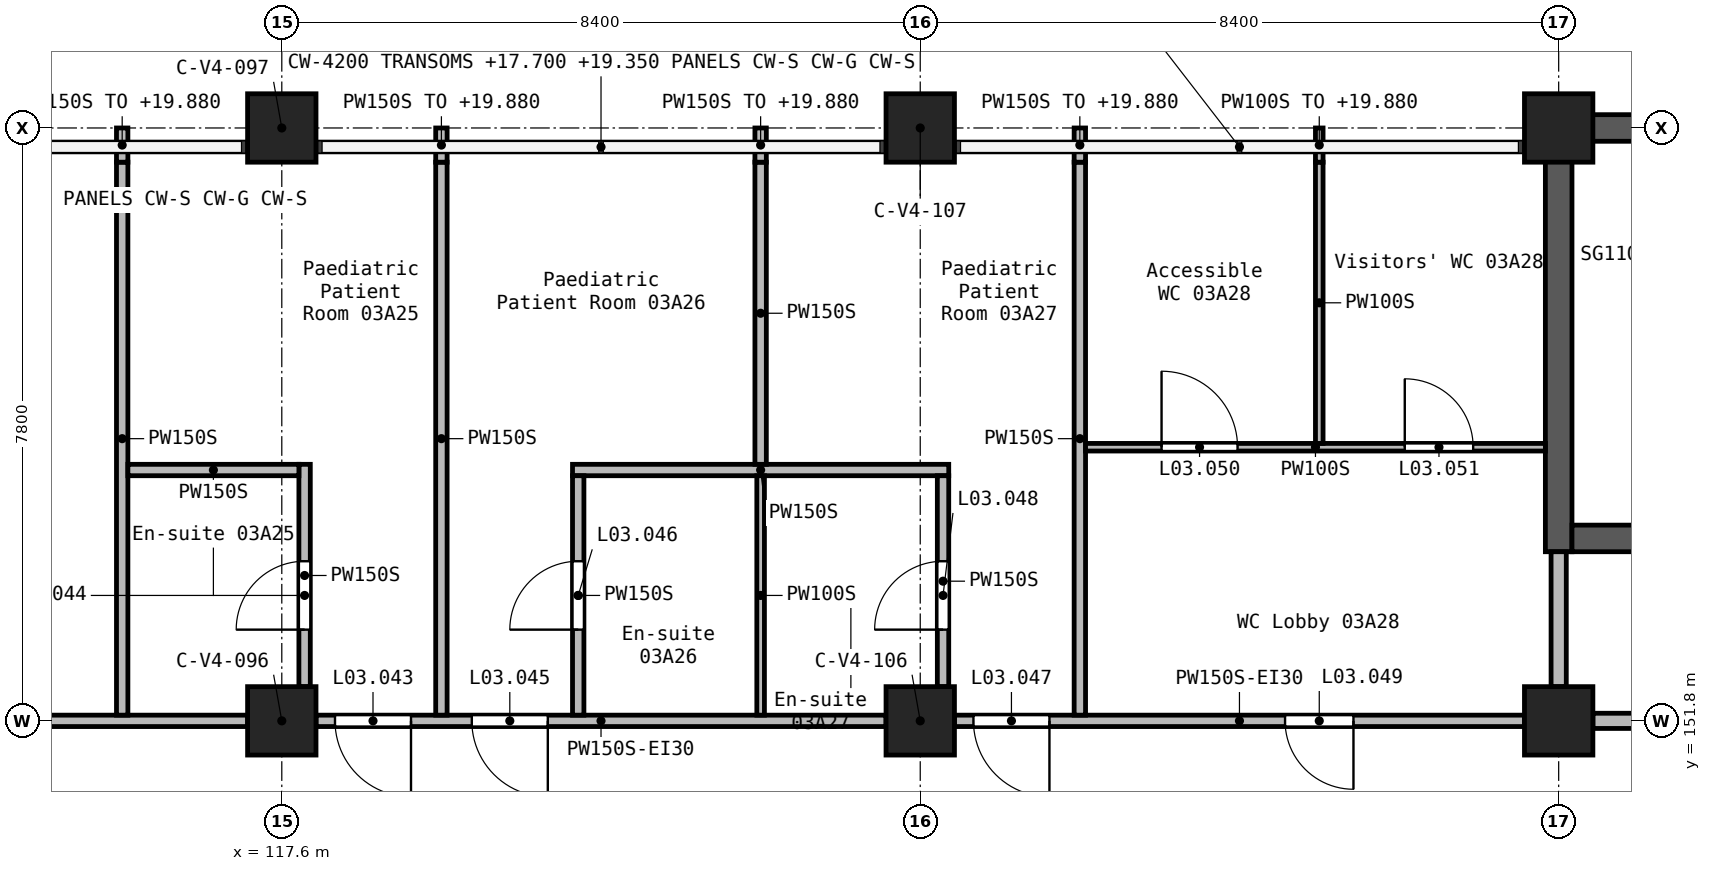
"""IFC4 building model, lengths in metres.
Left out: names, types, materials, properties, quantities, classifications, styles, units other than length and angle.
Written with IfcOpenShell. Run it as: python <this file> out.ifc"""

import sys

from ifc_helpers import new_model, si_unit, direction, frame, frame_2d, origin, origin_2d, place, context, subcontext, project, spatial, rectangle, extrude, element, fill, save


model = new_model("IFC4")
c1 = context("Model", 3, precision=1e-05, world=origin(), true_north=direction((0.0, 1.0)))
c2 = subcontext(c1, "Body", "Model", "MODEL_VIEW")
j1 = project(units=[si_unit("LENGTHUNIT", "METRE"), si_unit("PLANEANGLEUNIT", "RADIAN")], contexts=[c1])
p1 = place(None, origin())
s1 = spatial("IfcSite", under=j1, at=p1, CompositionType="ELEMENT")
p2 = place(p1, origin())
s2 = spatial("IfcBuilding", under=s1, at=p2, CompositionType="ELEMENT")
p3 = place(p2, frame((0.0, 0.0, 16.8)))
s3 = spatial("IfcBuildingStorey", under=s2, at=p3, CompositionType="ELEMENT", Elevation=16.8)
for number, where, z_axis, x_axis in (
    (1, (117.6, 151.8, 0.0), (0.0, 0.0, 1.0), (1.0, 0.0, 0.0)),
    (2, (117.6, 159.6, 0.0), (0.0, 0.0, 1.0), (1.0, 0.0, 0.0)),
    (3, (126.0, 151.8, 0.0), (0.0, 0.0, 1.0), (1.0, 0.0, 0.0)),
    (4, (126.0, 159.6, 0.0), (0.0, 0.0, 1.0), (1.0, 0.0, 0.0)),
    (5, (134.4, 151.8, 0.0), (0.0, 0.0, 1.0), (1.0, 0.0, 0.0)),
    (6, (134.4, 159.6, 0.0), (0.0, 0.0, 1.0), (1.0, 0.0, 0.0)),
):
    element("IfcColumn", number, at=place(p3, frame(where, z_axis=z_axis, x_axis=x_axis)), inside=s3, PredefinedType="COLUMN", context=c2, shape_type="SweptSolid", body=[
        extrude(rectangle(XDim=0.9, YDim=0.9, at=origin_2d()), origin(), (0.0, 0.0, 1.0), 4.2),
    ])
p4 = place(p3, frame((134.225, 159.6, 0.0), z_axis=(0.0, 0.0, 1.0), x_axis=(1.0, 0.0, 0.0)))
e7 = element("IfcWall", 7, at=p4, inside=s3, PredefinedType="SHEAR", context=c2, shape_type="SweptSolid", body=[
    extrude(rectangle(XDim=8.4, YDim=0.35, at=frame_2d((4.2, 0.0))), origin(), (0.0, 0.0, 1.0), 4.2),
])
p5 = place(p3, frame((134.4, 154.025, 0.0), z_axis=(0.0, 0.0, 1.0), x_axis=(0.0, 1.0, 0.0)))
e8 = element("IfcWall", 8, at=p5, inside=s3, PredefinedType="SHEAR", context=c2, shape_type="SweptSolid", body=[
    extrude(rectangle(XDim=5.4, YDim=0.35, at=frame_2d((2.7, 0.0))), origin(), (0.0, 0.0, 1.0), 4.2),
])
p6 = place(p3, frame((134.575, 154.2, 0.0), z_axis=(0.0, 0.0, 1.0), x_axis=(1.0, 0.0, 0.0)))
e9 = element("IfcWall", 9, at=p6, inside=s3, PredefinedType="SHEAR", context=c2, shape_type="SweptSolid", body=[
    extrude(rectangle(XDim=8.05, YDim=0.35, at=frame_2d((4.025, 0.0))), origin(), (0.0, 0.0, 1.0), 4.2),
])
p7 = place(p6, frame((6.525, 0.0, 0.0)))
e10 = element("IfcOpeningElement", 10, at=p7, cuts=e9, PredefinedType="OPENING", context=c2, shape_type="SweptSolid", body=[
    extrude(rectangle(XDim=1.1, YDim=2.1, at=frame_2d((0.55, 1.05))), frame((0.0, 0.185, 0.0), z_axis=(0.0, -1.0, 0.0), x_axis=(1.0, 0.0, 0.0)), (0.0, 0.0, 1.0), 0.37),
])
p8 = place(p3, frame((134.85, 151.8, 0.0), z_axis=(0.0, 0.0, 1.0), x_axis=(1.0, 0.0, 0.0)))
e11 = element("IfcWall", 11, at=p8, inside=s3, PredefinedType="SOLIDWALL", context=c2, shape_type="SweptSolid", body=[
    extrude(rectangle(XDim=7.5, YDim=0.2, at=frame_2d((3.75, 0.0))), origin(), (0.0, 0.0, 1.0), 3.9),
])
p9 = place(p8, frame((3.2, 0.0, 0.0)))
e12 = element("IfcOpeningElement", 12, at=p9, cuts=e11, PredefinedType="OPENING", context=c2, shape_type="SweptSolid", body=[
    extrude(rectangle(XDim=1.1, YDim=2.1, at=frame_2d((0.55, 1.05))), frame((0.0, 0.11, 0.0), z_axis=(0.0, -1.0, 0.0), x_axis=(1.0, 0.0, 0.0)), (0.0, 0.0, 1.0), 0.22),
])
p10 = place(p3, frame((134.4, 152.25, 0.0), z_axis=(0.0, 0.0, 1.0), x_axis=(0.0, 1.0, 0.0)))
e13 = element("IfcWall", 13, at=p10, inside=s3, PredefinedType="SOLIDWALL", context=c2, shape_type="SweptSolid", body=[
    extrude(rectangle(XDim=1.775, YDim=0.2, at=frame_2d((0.887, 0.0))), origin(), (0.0, 0.0, 1.0), 3.9),
])
p11 = place(p3, frame((133.95, 151.8, 0.0), z_axis=(0.0, 0.0, 1.0), x_axis=(-1.0, 0.0, 0.0)))
e14 = element("IfcWall", 14, at=p11, inside=s3, PredefinedType="PARTITIONING", context=c2, shape_type="SweptSolid", body=[
    extrude(rectangle(XDim=7.5, YDim=0.15, at=frame_2d((3.75, 0.0))), origin(), (0.0, 0.0, 1.0), 3.9),
])
p12 = place(p11, frame((6.25, 0.0, 0.0)))
e15 = element("IfcOpeningElement", 15, at=p12, cuts=e14, PredefinedType="OPENING", context=c2, shape_type="SweptSolid", body=[
    extrude(rectangle(XDim=1.0, YDim=2.1, at=frame_2d((0.5, 1.05))), frame((0.0, 0.085, 0.0), z_axis=(0.0, -1.0, 0.0), x_axis=(1.0, 0.0, 0.0)), (0.0, 0.0, 1.0), 0.17),
])
p13 = place(p11, frame((2.25, 0.0, 0.0)))
e16 = element("IfcOpeningElement", 16, at=p13, cuts=e14, PredefinedType="OPENING", context=c2, shape_type="SweptSolid", body=[
    extrude(rectangle(XDim=0.9, YDim=2.1, at=frame_2d((0.45, 1.05))), frame((0.0, 0.085, 0.0), z_axis=(0.0, -1.0, 0.0), x_axis=(1.0, 0.0, 0.0)), (0.0, 0.0, 1.0), 0.17),
])
p14 = place(p3, frame((125.55, 151.8, 0.0), z_axis=(0.0, 0.0, 1.0), x_axis=(-1.0, 0.0, 0.0)))
e17 = element("IfcWall", 17, at=p14, inside=s3, PredefinedType="PARTITIONING", context=c2, shape_type="SweptSolid", body=[
    extrude(rectangle(XDim=7.5, YDim=0.15, at=frame_2d((3.75, 0.0))), origin(), (0.0, 0.0, 1.0), 3.9),
])
p15 = place(p14, frame((6.25, 0.0, 0.0)))
e18 = element("IfcOpeningElement", 18, at=p15, cuts=e17, PredefinedType="OPENING", context=c2, shape_type="SweptSolid", body=[
    extrude(rectangle(XDim=1.0, YDim=2.1, at=frame_2d((0.5, 1.05))), frame((0.0, 0.085, 0.0), z_axis=(0.0, -1.0, 0.0), x_axis=(1.0, 0.0, 0.0)), (0.0, 0.0, 1.0), 0.17),
])
p16 = place(p14, frame((4.45, 0.0, 0.0)))
e19 = element("IfcOpeningElement", 19, at=p16, cuts=e17, PredefinedType="OPENING", context=c2, shape_type="SweptSolid", body=[
    extrude(rectangle(XDim=1.0, YDim=2.1, at=frame_2d((0.5, 1.05))), frame((0.0, 0.085, 0.0), z_axis=(0.0, -1.0, 0.0), x_axis=(1.0, 0.0, 0.0)), (0.0, 0.0, 1.0), 0.17),
])
p17 = place(p3, frame((117.15, 151.8, 0.0), z_axis=(0.0, 0.0, 1.0), x_axis=(-1.0, 0.0, 0.0)))
e20 = element("IfcWall", 20, at=p17, inside=s3, PredefinedType="PARTITIONING", context=c2, shape_type="SweptSolid", body=[
    extrude(rectangle(XDim=7.5, YDim=0.15, at=frame_2d((3.75, 0.0))), origin(), (0.0, 0.0, 1.0), 3.9),
])
p18 = place(p17, frame((2.95, 0.0, 0.0)))
e21 = element("IfcOpeningElement", 21, at=p18, cuts=e20, PredefinedType="OPENING", context=c2, shape_type="SweptSolid", body=[
    extrude(rectangle(XDim=1.0, YDim=2.1, at=frame_2d((0.5, 1.05))), frame((0.0, 0.085, 0.0), z_axis=(0.0, -1.0, 0.0), x_axis=(1.0, 0.0, 0.0)), (0.0, 0.0, 1.0), 0.17),
])
p19 = place(p3, frame((115.5, 151.875, 0.0), z_axis=(0.0, 0.0, 1.0), x_axis=(0.0, 1.0, 0.0)))
e22 = element("IfcWall", 22, at=p19, inside=s3, PredefinedType="PARTITIONING", context=c2, shape_type="SweptSolid", body=[
    extrude(rectangle(XDim=7.275, YDim=0.15, at=frame_2d((3.637, 0.0))), origin(), (0.0, 0.0, 1.0), 3.9),
])
p20 = place(p3, frame((115.5, 159.15, 0.0), z_axis=(0.0, 0.0, 1.0), x_axis=(0.0, 1.0, 0.0)))
e23 = element("IfcWall", 23, at=p20, inside=s3, PredefinedType="PARTITIONING", context=c2, shape_type="SweptSolid", body=[
    extrude(rectangle(XDim=0.45, YDim=0.15, at=frame_2d((0.225, 0.0))), origin(), (0.0, 0.0, 1.0), 3.08),
])
p21 = place(p3, frame((119.7, 151.875, 0.0), z_axis=(0.0, 0.0, 1.0), x_axis=(0.0, 1.0, 0.0)))
e24 = element("IfcWall", 24, at=p21, inside=s3, PredefinedType="PARTITIONING", context=c2, shape_type="SweptSolid", body=[
    extrude(rectangle(XDim=7.275, YDim=0.15, at=frame_2d((3.637, 0.0))), origin(), (0.0, 0.0, 1.0), 3.9),
])
p22 = place(p3, frame((119.7, 159.15, 0.0), z_axis=(0.0, 0.0, 1.0), x_axis=(0.0, 1.0, 0.0)))
e25 = element("IfcWall", 25, at=p22, inside=s3, PredefinedType="PARTITIONING", context=c2, shape_type="SweptSolid", body=[
    extrude(rectangle(XDim=0.45, YDim=0.15, at=frame_2d((0.225, 0.0))), origin(), (0.0, 0.0, 1.0), 3.08),
])
p23 = place(p3, frame((128.1, 151.875, 0.0), z_axis=(0.0, 0.0, 1.0), x_axis=(0.0, 1.0, 0.0)))
e26 = element("IfcWall", 26, at=p23, inside=s3, PredefinedType="PARTITIONING", context=c2, shape_type="SweptSolid", body=[
    extrude(rectangle(XDim=7.275, YDim=0.15, at=frame_2d((3.637, 0.0))), origin(), (0.0, 0.0, 1.0), 3.9),
])
p24 = place(p3, frame((128.1, 159.15, 0.0), z_axis=(0.0, 0.0, 1.0), x_axis=(0.0, 1.0, 0.0)))
e27 = element("IfcWall", 27, at=p24, inside=s3, PredefinedType="PARTITIONING", context=c2, shape_type="SweptSolid", body=[
    extrude(rectangle(XDim=0.45, YDim=0.15, at=frame_2d((0.225, 0.0))), origin(), (0.0, 0.0, 1.0), 3.08),
])
p25 = place(p3, frame((121.425, 155.1, 0.0), z_axis=(0.0, 0.0, 1.0), x_axis=(1.0, 0.0, 0.0)))
e28 = element("IfcWall", 28, at=p25, inside=s3, PredefinedType="PARTITIONING", context=c2, shape_type="SweptSolid", body=[
    extrude(rectangle(XDim=4.95, YDim=0.15, at=frame_2d((2.475, 0.0))), origin(), (0.0, 0.0, 1.0), 3.9),
])
p26 = place(p3, frame((123.9, 155.175, 0.0), z_axis=(0.0, 0.0, 1.0), x_axis=(0.0, 1.0, 0.0)))
e29 = element("IfcWall", 29, at=p26, inside=s3, PredefinedType="PARTITIONING", context=c2, shape_type="SweptSolid", body=[
    extrude(rectangle(XDim=3.975, YDim=0.15, at=frame_2d((1.987, 0.0))), origin(), (0.0, 0.0, 1.0), 3.9),
])
p27 = place(p3, frame((123.9, 159.15, 0.0), z_axis=(0.0, 0.0, 1.0), x_axis=(0.0, 1.0, 0.0)))
e30 = element("IfcWall", 30, at=p27, inside=s3, PredefinedType="PARTITIONING", context=c2, shape_type="SweptSolid", body=[
    extrude(rectangle(XDim=0.45, YDim=0.15, at=frame_2d((0.225, 0.0))), origin(), (0.0, 0.0, 1.0), 3.08),
])
p28 = place(p3, frame((117.9, 152.25, 0.0), z_axis=(0.0, 0.0, 1.0), x_axis=(0.0, 1.0, 0.0)))
e31 = element("IfcWall", 31, at=p28, inside=s3, PredefinedType="PARTITIONING", context=c2, shape_type="SweptSolid", body=[
    extrude(rectangle(XDim=2.925, YDim=0.15, at=frame_2d((1.462, 0.0))), origin(), (0.0, 0.0, 1.0), 3.9),
])
p29 = place(p28, frame((0.75, 0.0, 0.0)))
e32 = element("IfcOpeningElement", 32, at=p29, cuts=e31, PredefinedType="OPENING", context=c2, shape_type="SweptSolid", body=[
    extrude(rectangle(XDim=0.9, YDim=2.1, at=frame_2d((0.45, 1.05))), frame((0.0, 0.085, 0.0), z_axis=(0.0, -1.0, 0.0), x_axis=(1.0, 0.0, 0.0)), (0.0, 0.0, 1.0), 0.17),
])
p30 = place(p3, frame((121.5, 151.875, 0.0), z_axis=(0.0, 0.0, 1.0), x_axis=(0.0, 1.0, 0.0)))
e33 = element("IfcWall", 33, at=p30, inside=s3, PredefinedType="PARTITIONING", context=c2, shape_type="SweptSolid", body=[
    extrude(rectangle(XDim=3.15, YDim=0.15, at=frame_2d((1.575, 0.0))), origin(), (0.0, 0.0, 1.0), 3.9),
])
p31 = place(p30, frame((1.125, 0.0, 0.0)))
e34 = element("IfcOpeningElement", 34, at=p31, cuts=e33, PredefinedType="OPENING", context=c2, shape_type="SweptSolid", body=[
    extrude(rectangle(XDim=0.9, YDim=2.1, at=frame_2d((0.45, 1.05))), frame((0.0, 0.085, 0.0), z_axis=(0.0, -1.0, 0.0), x_axis=(1.0, 0.0, 0.0)), (0.0, 0.0, 1.0), 0.17),
])
p32 = place(p3, frame((126.3, 152.25, 0.0), z_axis=(0.0, 0.0, 1.0), x_axis=(0.0, 1.0, 0.0)))
e35 = element("IfcWall", 35, at=p32, inside=s3, PredefinedType="PARTITIONING", context=c2, shape_type="SweptSolid", body=[
    extrude(rectangle(XDim=2.775, YDim=0.15, at=frame_2d((1.387, 0.0))), origin(), (0.0, 0.0, 1.0), 3.9),
])
p33 = place(p32, frame((0.75, 0.0, 0.0)))
e36 = element("IfcOpeningElement", 36, at=p33, cuts=e35, PredefinedType="OPENING", context=c2, shape_type="SweptSolid", body=[
    extrude(rectangle(XDim=0.9, YDim=2.1, at=frame_2d((0.45, 1.05))), frame((0.0, 0.085, 0.0), z_axis=(0.0, -1.0, 0.0), x_axis=(1.0, 0.0, 0.0)), (0.0, 0.0, 1.0), 0.17),
])
p34 = place(p3, frame((115.575, 155.1, 0.0), z_axis=(0.0, 0.0, 1.0), x_axis=(1.0, 0.0, 0.0)))
e37 = element("IfcWall", 37, at=p34, inside=s3, PredefinedType="PARTITIONING", context=c2, shape_type="SweptSolid", body=[
    extrude(rectangle(XDim=2.25, YDim=0.15, at=frame_2d((1.125, 0.0))), origin(), (0.0, 0.0, 1.0), 3.9),
])
p35 = place(p3, frame((128.175, 155.4, 0.0), z_axis=(0.0, 0.0, 1.0), x_axis=(1.0, 0.0, 0.0)))
e38 = element("IfcWall", 38, at=p35, inside=s3, PredefinedType="PARTITIONING", context=c2, shape_type="SweptSolid", body=[
    extrude(rectangle(XDim=6.05, YDim=0.1, at=frame_2d((3.025, 0.0))), origin(), (0.0, 0.0, 1.0), 3.9),
])
p36 = place(p35, frame((1.0, 0.0, 0.0)))
e39 = element("IfcOpeningElement", 39, at=p36, cuts=e38, PredefinedType="OPENING", context=c2, shape_type="SweptSolid", body=[
    extrude(rectangle(XDim=1.0, YDim=2.1, at=frame_2d((0.5, 1.05))), frame((0.0, 0.06, 0.0), z_axis=(0.0, -1.0, 0.0), x_axis=(1.0, 0.0, 0.0)), (0.0, 0.0, 1.0), 0.12),
])
p37 = place(p35, frame((4.2, 0.0, 0.0)))
e40 = element("IfcOpeningElement", 40, at=p37, cuts=e38, PredefinedType="OPENING", context=c2, shape_type="SweptSolid", body=[
    extrude(rectangle(XDim=0.9, YDim=2.1, at=frame_2d((0.45, 1.05))), frame((0.0, 0.06, 0.0), z_axis=(0.0, -1.0, 0.0), x_axis=(1.0, 0.0, 0.0)), (0.0, 0.0, 1.0), 0.12),
])
p38 = place(p3, frame((131.25, 155.45, 0.0), z_axis=(0.0, 0.0, 1.0), x_axis=(0.0, 1.0, 0.0)))
e41 = element("IfcWall", 41, at=p38, inside=s3, PredefinedType="PARTITIONING", context=c2, shape_type="SweptSolid", body=[
    extrude(rectangle(XDim=3.7, YDim=0.1, at=frame_2d((1.85, 0.0))), origin(), (0.0, 0.0, 1.0), 3.9),
])
p39 = place(p3, frame((131.25, 159.15, 0.0), z_axis=(0.0, 0.0, 1.0), x_axis=(0.0, 1.0, 0.0)))
e42 = element("IfcWall", 42, at=p39, inside=s3, PredefinedType="PARTITIONING", context=c2, shape_type="SweptSolid", body=[
    extrude(rectangle(XDim=0.45, YDim=0.1, at=frame_2d((0.225, 0.0))), origin(), (0.0, 0.0, 1.0), 3.08),
])
p40 = place(p3, frame((123.9, 151.875, 0.0), z_axis=(0.0, 0.0, 1.0), x_axis=(0.0, 1.0, 0.0)))
e43 = element("IfcWall", 43, at=p40, inside=s3, PredefinedType="PARTITIONING", context=c2, shape_type="SweptSolid", body=[
    extrude(rectangle(XDim=3.15, YDim=0.1, at=frame_2d((1.575, 0.0))), origin(), (0.0, 0.0, 1.0), 3.9),
])
p41 = place(p15, frame((1.0, 0.0, 0.0), z_axis=(0.0, 0.0, 1.0), x_axis=(-1.0, 0.0, 0.0)))
e44 = element("IfcDoor", 44, at=p41, inside=s3, OperationType="SINGLE_SWING_LEFT", PredefinedType="DOOR", context=c2, shape_type="SweptSolid", body=[
    extrude(rectangle(XDim=1.0, YDim=2.1, at=frame_2d((0.5, 1.05))), frame((0.0, 0.025, 0.0), z_axis=(0.0, -1.0, 0.0), x_axis=(1.0, 0.0, 0.0)), (0.0, 0.0, 1.0), 0.05),
])
fill(e18, e44)
p42 = place(p29, origin())
e45 = element("IfcDoor", 45, at=p42, inside=s3, OperationType="SINGLE_SWING_LEFT", PredefinedType="DOOR", context=c2, shape_type="SweptSolid", body=[
    extrude(rectangle(XDim=0.9, YDim=2.1, at=frame_2d((0.45, 1.05))), frame((0.0, 0.025, 0.0), z_axis=(0.0, -1.0, 0.0), x_axis=(1.0, 0.0, 0.0)), (0.0, 0.0, 1.0), 0.05),
])
fill(e32, e45)
p43 = place(p16, frame((1.0, 0.0, 0.0), z_axis=(0.0, 0.0, 1.0), x_axis=(-1.0, 0.0, 0.0)))
e46 = element("IfcDoor", 46, at=p43, inside=s3, OperationType="SINGLE_SWING_LEFT", PredefinedType="DOOR", context=c2, shape_type="SweptSolid", body=[
    extrude(rectangle(XDim=1.0, YDim=2.1, at=frame_2d((0.5, 1.05))), frame((0.0, 0.025, 0.0), z_axis=(0.0, -1.0, 0.0), x_axis=(1.0, 0.0, 0.0)), (0.0, 0.0, 1.0), 0.05),
])
fill(e19, e46)
p44 = place(p31, frame((0.9, 0.0, 0.0), z_axis=(0.0, 0.0, 1.0), x_axis=(-1.0, 0.0, 0.0)))
e47 = element("IfcDoor", 47, at=p44, inside=s3, OperationType="SINGLE_SWING_LEFT", PredefinedType="DOOR", context=c2, shape_type="SweptSolid", body=[
    extrude(rectangle(XDim=0.9, YDim=2.1, at=frame_2d((0.45, 1.05))), frame((0.0, 0.025, 0.0), z_axis=(0.0, -1.0, 0.0), x_axis=(1.0, 0.0, 0.0)), (0.0, 0.0, 1.0), 0.05),
])
fill(e34, e47)
p45 = place(p12, frame((1.0, 0.0, 0.0), z_axis=(0.0, 0.0, 1.0), x_axis=(-1.0, 0.0, 0.0)))
e48 = element("IfcDoor", 48, at=p45, inside=s3, OperationType="SINGLE_SWING_LEFT", PredefinedType="DOOR", context=c2, shape_type="SweptSolid", body=[
    extrude(rectangle(XDim=1.0, YDim=2.1, at=frame_2d((0.5, 1.05))), frame((0.0, 0.025, 0.0), z_axis=(0.0, -1.0, 0.0), x_axis=(1.0, 0.0, 0.0)), (0.0, 0.0, 1.0), 0.05),
])
fill(e15, e48)
p46 = place(p33, origin())
e49 = element("IfcDoor", 49, at=p46, inside=s3, OperationType="SINGLE_SWING_LEFT", PredefinedType="DOOR", context=c2, shape_type="SweptSolid", body=[
    extrude(rectangle(XDim=0.9, YDim=2.1, at=frame_2d((0.45, 1.05))), frame((0.0, 0.025, 0.0), z_axis=(0.0, -1.0, 0.0), x_axis=(1.0, 0.0, 0.0)), (0.0, 0.0, 1.0), 0.05),
])
fill(e36, e49)
p47 = place(p13, frame((0.9, 0.0, 0.0), z_axis=(0.0, 0.0, 1.0), x_axis=(-1.0, 0.0, 0.0)))
e50 = element("IfcDoor", 50, at=p47, inside=s3, OperationType="SINGLE_SWING_RIGHT", PredefinedType="DOOR", context=c2, shape_type="SweptSolid", body=[
    extrude(rectangle(XDim=0.9, YDim=2.1, at=frame_2d((0.45, 1.05))), frame((0.0, 0.025, 0.0), z_axis=(0.0, -1.0, 0.0), x_axis=(1.0, 0.0, 0.0)), (0.0, 0.0, 1.0), 0.05),
])
fill(e16, e50)
p48 = place(p36, origin())
e51 = element("IfcDoor", 51, at=p48, inside=s3, OperationType="SINGLE_SWING_LEFT", PredefinedType="DOOR", context=c2, shape_type="SweptSolid", body=[
    extrude(rectangle(XDim=1.0, YDim=2.1, at=frame_2d((0.5, 1.05))), frame((0.0, 0.025, 0.0), z_axis=(0.0, -1.0, 0.0), x_axis=(1.0, 0.0, 0.0)), (0.0, 0.0, 1.0), 0.05),
])
fill(e39, e51)
p49 = place(p37, origin())
e52 = element("IfcDoor", 52, at=p49, inside=s3, OperationType="SINGLE_SWING_RIGHT", PredefinedType="DOOR", context=c2, shape_type="SweptSolid", body=[
    extrude(rectangle(XDim=0.9, YDim=2.1, at=frame_2d((0.45, 1.05))), frame((0.0, 0.025, 0.0), z_axis=(0.0, -1.0, 0.0), x_axis=(1.0, 0.0, 0.0)), (0.0, 0.0, 1.0), 0.05),
])
fill(e40, e52)
save(model, sys.argv[1])
